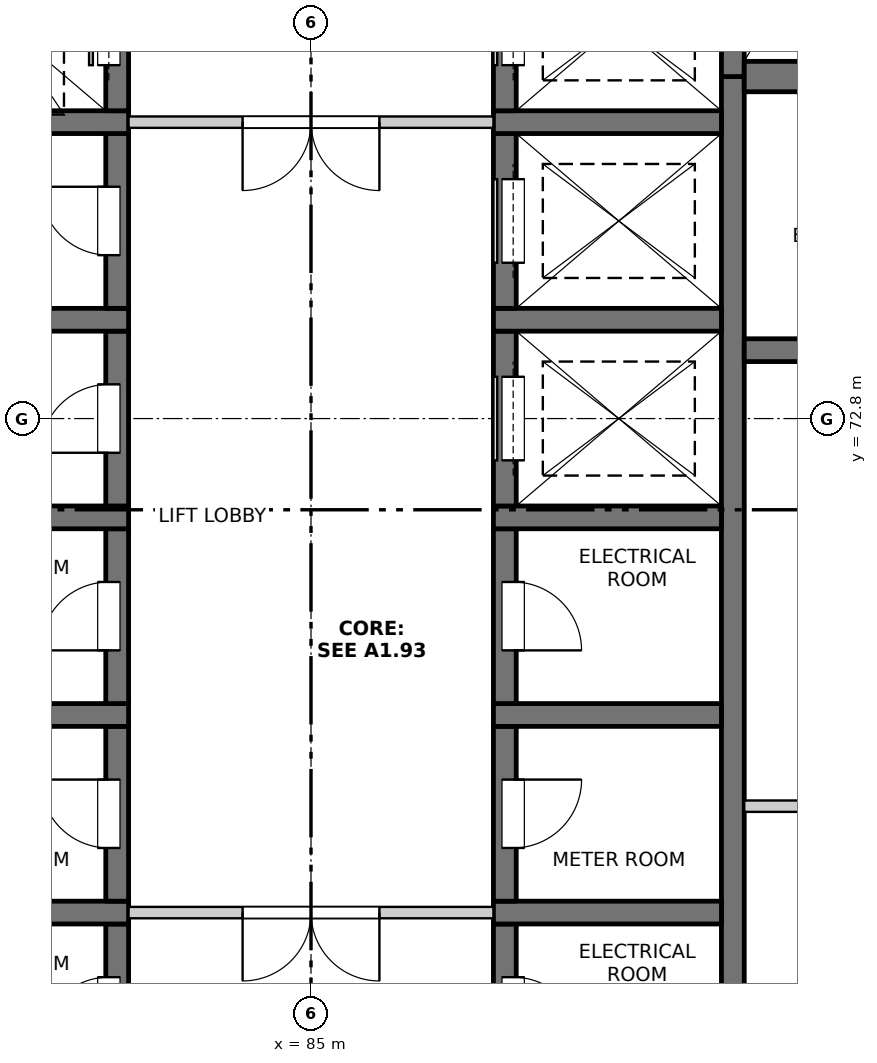
"""IFC4 building model, lengths in metres.
Left out: names, types, materials, properties, quantities, classifications, styles, units other than length and angle.
Written with IfcOpenShell. Run it as: python <this file> out.ifc"""

import sys

from ifc_helpers import new_model, si_unit, direction, frame, frame_2d, origin, place, context, subcontext, project, spatial, rectangle, extrude, element, fill, save


model = new_model("IFC4")
c1 = context("Model", 3, precision=1e-05, world=origin(), true_north=direction((0.0, 1.0)))
c2 = subcontext(c1, "Body", "Model", "MODEL_VIEW")
j1 = project(units=[si_unit("LENGTHUNIT", "METRE"), si_unit("PLANEANGLEUNIT", "RADIAN")], contexts=[c1])
p1 = place(None, origin())
s1 = spatial("IfcSite", under=j1, at=p1, CompositionType="ELEMENT")
p2 = place(p1, origin())
s2 = spatial("IfcBuilding", under=s1, at=p2, CompositionType="ELEMENT")
p3 = place(p2, frame((0.0, 0.0, 152.0)))
s3 = spatial("IfcBuildingStorey", under=s2, at=p3, CompositionType="ELEMENT", Elevation=152.0)
p4 = place(p3, frame((90.55, 61.95, -0.25), z_axis=(0.0, 0.0, 1.0), x_axis=(0.0, 1.0, 0.0)))
e1 = element("IfcWall", 1, at=p4, inside=s3, PredefinedType="SOLIDWALL", context=c2, shape_type="SweptSolid", body=[
    extrude(rectangle(XDim=15.35, YDim=0.3, at=frame_2d((7.675, 0.0))), origin(), (0.0, 0.0, 1.0), 3.4),
])
p5 = place(p3, frame((90.55, 77.3, -0.25), z_axis=(0.0, 0.0, 1.0), x_axis=(0.0, 1.0, 0.0)))
e2 = element("IfcWall", 2, at=p5, inside=s3, PredefinedType="SOLIDWALL", context=c2, shape_type="SweptSolid", body=[
    extrude(rectangle(XDim=6.925, YDim=0.3, at=frame_2d((3.462, 0.0))), origin(), (0.0, 0.0, 1.0), 3.4),
])
p6 = place(p3, frame((82.45, 63.85, -0.25), z_axis=(0.0, 0.0, 1.0), x_axis=(0.0, 1.0, 0.0)))
e3 = element("IfcWall", 3, at=p6, inside=s3, PredefinedType="SOLIDWALL", context=c2, shape_type="SweptSolid", body=[
    extrude(rectangle(XDim=2.3, YDim=0.3, at=frame_2d((1.15, 0.0))), origin(), (0.0, 0.0, 1.0), 3.4),
])
p7 = place(p6, frame((0.7, 0.0, 0.25)))
e4 = element("IfcOpeningElement", 4, at=p7, cuts=e3, PredefinedType="OPENING", context=c2, shape_type="SweptSolid", body=[
    extrude(rectangle(XDim=0.9, YDim=2.1, at=frame_2d((0.45, 1.05))), frame((0.0, 0.16, 0.0), z_axis=(0.0, -1.0, 0.0), x_axis=(1.0, 0.0, 0.0)), (0.0, 0.0, 1.0), 0.32),
])
p8 = place(p3, frame((79.6, 66.3, -0.25), z_axis=(0.0, 0.0, 1.0), x_axis=(1.0, 0.0, 0.0)))
e5 = element("IfcWall", 5, at=p8, inside=s3, PredefinedType="SOLIDWALL", context=c2, shape_type="SweptSolid", body=[
    extrude(rectangle(XDim=3.0, YDim=0.3, at=frame_2d((1.5, 0.0))), origin(), (0.0, 0.0, 1.0), 3.4),
])
p9 = place(p3, frame((82.45, 66.45, -0.25), z_axis=(0.0, 0.0, 1.0), x_axis=(0.0, 1.0, 0.0)))
e6 = element("IfcWall", 6, at=p9, inside=s3, PredefinedType="SOLIDWALL", context=c2, shape_type="SweptSolid", body=[
    extrude(rectangle(XDim=2.3, YDim=0.3, at=frame_2d((1.15, 0.0))), origin(), (0.0, 0.0, 1.0), 3.4),
])
p10 = place(p9, frame((0.7, 0.0, 0.25)))
e7 = element("IfcOpeningElement", 7, at=p10, cuts=e6, PredefinedType="OPENING", context=c2, shape_type="SweptSolid", body=[
    extrude(rectangle(XDim=0.9, YDim=2.1, at=frame_2d((0.45, 1.05))), frame((0.0, 0.16, 0.0), z_axis=(0.0, -1.0, 0.0), x_axis=(1.0, 0.0, 0.0)), (0.0, 0.0, 1.0), 0.32),
])
p11 = place(p3, frame((79.6, 68.9, -0.25), z_axis=(0.0, 0.0, 1.0), x_axis=(1.0, 0.0, 0.0)))
e8 = element("IfcWall", 8, at=p11, inside=s3, PredefinedType="SOLIDWALL", context=c2, shape_type="SweptSolid", body=[
    extrude(rectangle(XDim=3.0, YDim=0.3, at=frame_2d((1.5, 0.0))), origin(), (0.0, 0.0, 1.0), 3.4),
])
p12 = place(p3, frame((82.45, 69.05, -0.25), z_axis=(0.0, 0.0, 1.0), x_axis=(0.0, 1.0, 0.0)))
e9 = element("IfcWall", 9, at=p12, inside=s3, PredefinedType="SOLIDWALL", context=c2, shape_type="SweptSolid", body=[
    extrude(rectangle(XDim=2.3, YDim=0.3, at=frame_2d((1.15, 0.0))), origin(), (0.0, 0.0, 1.0), 3.4),
])
p13 = place(p12, frame((0.7, 0.0, 0.25)))
e10 = element("IfcOpeningElement", 10, at=p13, cuts=e9, PredefinedType="OPENING", context=c2, shape_type="SweptSolid", body=[
    extrude(rectangle(XDim=0.9, YDim=2.1, at=frame_2d((0.45, 1.05))), frame((0.0, 0.16, 0.0), z_axis=(0.0, -1.0, 0.0), x_axis=(1.0, 0.0, 0.0)), (0.0, 0.0, 1.0), 0.32),
])
p14 = place(p3, frame((79.6, 71.5, -0.25), z_axis=(0.0, 0.0, 1.0), x_axis=(1.0, 0.0, 0.0)))
e11 = element("IfcWall", 11, at=p14, inside=s3, PredefinedType="SOLIDWALL", context=c2, shape_type="SweptSolid", body=[
    extrude(rectangle(XDim=3.0, YDim=0.3, at=frame_2d((1.5, 0.0))), origin(), (0.0, 0.0, 1.0), 3.4),
])
p15 = place(p3, frame((82.45, 71.65, -0.25), z_axis=(0.0, 0.0, 1.0), x_axis=(0.0, 1.0, 0.0)))
e12 = element("IfcWall", 12, at=p15, inside=s3, PredefinedType="SOLIDWALL", context=c2, shape_type="SweptSolid", body=[
    extrude(rectangle(XDim=2.3, YDim=0.3, at=frame_2d((1.15, 0.0))), origin(), (0.0, 0.0, 1.0), 3.4),
])
p16 = place(p15, frame((0.7, 0.0, 0.25)))
e13 = element("IfcOpeningElement", 13, at=p16, cuts=e12, PredefinedType="OPENING", context=c2, shape_type="SweptSolid", body=[
    extrude(rectangle(XDim=0.9, YDim=2.1, at=frame_2d((0.45, 1.05))), frame((0.0, 0.16, 0.0), z_axis=(0.0, -1.0, 0.0), x_axis=(1.0, 0.0, 0.0)), (0.0, 0.0, 1.0), 0.32),
])
p17 = place(p3, frame((79.6, 74.1, -0.25), z_axis=(0.0, 0.0, 1.0), x_axis=(1.0, 0.0, 0.0)))
e14 = element("IfcWall", 14, at=p17, inside=s3, PredefinedType="SOLIDWALL", context=c2, shape_type="SweptSolid", body=[
    extrude(rectangle(XDim=3.0, YDim=0.3, at=frame_2d((1.5, 0.0))), origin(), (0.0, 0.0, 1.0), 3.4),
])
p18 = place(p3, frame((82.45, 74.25, -0.25), z_axis=(0.0, 0.0, 1.0), x_axis=(0.0, 1.0, 0.0)))
e15 = element("IfcWall", 15, at=p18, inside=s3, PredefinedType="SOLIDWALL", context=c2, shape_type="SweptSolid", body=[
    extrude(rectangle(XDim=2.3, YDim=0.3, at=frame_2d((1.15, 0.0))), origin(), (0.0, 0.0, 1.0), 3.4),
])
p19 = place(p18, frame((0.7, 0.0, 0.25)))
e16 = element("IfcOpeningElement", 16, at=p19, cuts=e15, PredefinedType="OPENING", context=c2, shape_type="SweptSolid", body=[
    extrude(rectangle(XDim=0.9, YDim=2.1, at=frame_2d((0.45, 1.05))), frame((0.0, 0.16, 0.0), z_axis=(0.0, -1.0, 0.0), x_axis=(1.0, 0.0, 0.0)), (0.0, 0.0, 1.0), 0.32),
])
p20 = place(p3, frame((79.6, 76.7, -0.25), z_axis=(0.0, 0.0, 1.0), x_axis=(1.0, 0.0, 0.0)))
e17 = element("IfcWall", 17, at=p20, inside=s3, PredefinedType="SOLIDWALL", context=c2, shape_type="SweptSolid", body=[
    extrude(rectangle(XDim=3.0, YDim=0.3, at=frame_2d((1.5, 0.0))), origin(), (0.0, 0.0, 1.0), 3.4),
])
p21 = place(p3, frame((82.45, 76.85, -0.25), z_axis=(0.0, 0.0, 1.0), x_axis=(0.0, 1.0, 0.0)))
e18 = element("IfcWall", 18, at=p21, inside=s3, PredefinedType="SOLIDWALL", context=c2, shape_type="SweptSolid", body=[
    extrude(rectangle(XDim=2.3, YDim=0.3, at=frame_2d((1.15, 0.0))), origin(), (0.0, 0.0, 1.0), 3.4),
])
p22 = place(p21, frame((0.6, 0.0, 0.25)))
e19 = element("IfcOpeningElement", 19, at=p22, cuts=e18, PredefinedType="OPENING", context=c2, shape_type="SweptSolid", body=[
    extrude(rectangle(XDim=1.1, YDim=2.1, at=frame_2d((0.55, 1.05))), frame((0.0, 0.16, 0.0), z_axis=(0.0, -1.0, 0.0), x_axis=(1.0, 0.0, 0.0)), (0.0, 0.0, 1.0), 0.32),
])
p23 = place(p3, frame((87.55, 63.85, -0.25), z_axis=(0.0, 0.0, 1.0), x_axis=(0.0, 1.0, 0.0)))
e20 = element("IfcWall", 20, at=p23, inside=s3, PredefinedType="SOLIDWALL", context=c2, shape_type="SweptSolid", body=[
    extrude(rectangle(XDim=2.3, YDim=0.3, at=frame_2d((1.15, 0.0))), origin(), (0.0, 0.0, 1.0), 3.4),
])
p24 = place(p23, frame((0.7, 0.0, 0.25)))
e21 = element("IfcOpeningElement", 21, at=p24, cuts=e20, PredefinedType="OPENING", context=c2, shape_type="SweptSolid", body=[
    extrude(rectangle(XDim=0.9, YDim=2.1, at=frame_2d((0.45, 1.05))), frame((0.0, 0.16, 0.0), z_axis=(0.0, -1.0, 0.0), x_axis=(1.0, 0.0, 0.0)), (0.0, 0.0, 1.0), 0.32),
])
p25 = place(p3, frame((87.4, 66.3, -0.25), z_axis=(0.0, 0.0, 1.0), x_axis=(1.0, 0.0, 0.0)))
e22 = element("IfcWall", 22, at=p25, inside=s3, PredefinedType="SOLIDWALL", context=c2, shape_type="SweptSolid", body=[
    extrude(rectangle(XDim=3.0, YDim=0.3, at=frame_2d((1.5, 0.0))), origin(), (0.0, 0.0, 1.0), 3.4),
])
p26 = place(p3, frame((87.55, 66.45, -0.25), z_axis=(0.0, 0.0, 1.0), x_axis=(0.0, 1.0, 0.0)))
e23 = element("IfcWall", 23, at=p26, inside=s3, PredefinedType="SOLIDWALL", context=c2, shape_type="SweptSolid", body=[
    extrude(rectangle(XDim=2.3, YDim=0.3, at=frame_2d((1.15, 0.0))), origin(), (0.0, 0.0, 1.0), 3.4),
])
p27 = place(p26, frame((0.7, 0.0, 0.25)))
e24 = element("IfcOpeningElement", 24, at=p27, cuts=e23, PredefinedType="OPENING", context=c2, shape_type="SweptSolid", body=[
    extrude(rectangle(XDim=0.9, YDim=2.1, at=frame_2d((0.45, 1.05))), frame((0.0, 0.16, 0.0), z_axis=(0.0, -1.0, 0.0), x_axis=(1.0, 0.0, 0.0)), (0.0, 0.0, 1.0), 0.32),
])
p28 = place(p3, frame((87.4, 68.9, -0.25), z_axis=(0.0, 0.0, 1.0), x_axis=(1.0, 0.0, 0.0)))
e25 = element("IfcWall", 25, at=p28, inside=s3, PredefinedType="SOLIDWALL", context=c2, shape_type="SweptSolid", body=[
    extrude(rectangle(XDim=3.0, YDim=0.3, at=frame_2d((1.5, 0.0))), origin(), (0.0, 0.0, 1.0), 3.4),
])
p29 = place(p3, frame((87.55, 69.05, -0.25), z_axis=(0.0, 0.0, 1.0), x_axis=(0.0, 1.0, 0.0)))
e26 = element("IfcWall", 26, at=p29, inside=s3, PredefinedType="SOLIDWALL", context=c2, shape_type="SweptSolid", body=[
    extrude(rectangle(XDim=2.3, YDim=0.3, at=frame_2d((1.15, 0.0))), origin(), (0.0, 0.0, 1.0), 3.4),
])
p30 = place(p29, frame((0.7, 0.0, 0.25)))
e27 = element("IfcOpeningElement", 27, at=p30, cuts=e26, PredefinedType="OPENING", context=c2, shape_type="SweptSolid", body=[
    extrude(rectangle(XDim=0.9, YDim=2.1, at=frame_2d((0.45, 1.05))), frame((0.0, 0.16, 0.0), z_axis=(0.0, -1.0, 0.0), x_axis=(1.0, 0.0, 0.0)), (0.0, 0.0, 1.0), 0.32),
])
p31 = place(p3, frame((87.4, 71.5, -0.25), z_axis=(0.0, 0.0, 1.0), x_axis=(1.0, 0.0, 0.0)))
e28 = element("IfcWall", 28, at=p31, inside=s3, PredefinedType="SOLIDWALL", context=c2, shape_type="SweptSolid", body=[
    extrude(rectangle(XDim=3.0, YDim=0.3, at=frame_2d((1.5, 0.0))), origin(), (0.0, 0.0, 1.0), 3.4),
])
p32 = place(p3, frame((87.55, 71.65, -0.25), z_axis=(0.0, 0.0, 1.0), x_axis=(0.0, 1.0, 0.0)))
e29 = element("IfcWall", 29, at=p32, inside=s3, PredefinedType="SOLIDWALL", context=c2, shape_type="SweptSolid", body=[
    extrude(rectangle(XDim=2.3, YDim=0.3, at=frame_2d((1.15, 0.0))), origin(), (0.0, 0.0, 1.0), 3.4),
])
p33 = place(p32, frame((0.6, 0.0, 0.25)))
e30 = element("IfcOpeningElement", 30, at=p33, cuts=e29, PredefinedType="OPENING", context=c2, shape_type="SweptSolid", body=[
    extrude(rectangle(XDim=1.1, YDim=2.1, at=frame_2d((0.55, 1.05))), frame((0.0, 0.16, 0.0), z_axis=(0.0, -1.0, 0.0), x_axis=(1.0, 0.0, 0.0)), (0.0, 0.0, 1.0), 0.32),
])
p34 = place(p3, frame((87.4, 74.1, -0.25), z_axis=(0.0, 0.0, 1.0), x_axis=(1.0, 0.0, 0.0)))
e31 = element("IfcWall", 31, at=p34, inside=s3, PredefinedType="SOLIDWALL", context=c2, shape_type="SweptSolid", body=[
    extrude(rectangle(XDim=3.0, YDim=0.3, at=frame_2d((1.5, 0.0))), origin(), (0.0, 0.0, 1.0), 3.4),
])
p35 = place(p3, frame((87.55, 74.25, -0.25), z_axis=(0.0, 0.0, 1.0), x_axis=(0.0, 1.0, 0.0)))
e32 = element("IfcWall", 32, at=p35, inside=s3, PredefinedType="SOLIDWALL", context=c2, shape_type="SweptSolid", body=[
    extrude(rectangle(XDim=2.3, YDim=0.3, at=frame_2d((1.15, 0.0))), origin(), (0.0, 0.0, 1.0), 3.4),
])
p36 = place(p35, frame((0.6, 0.0, 0.25)))
e33 = element("IfcOpeningElement", 33, at=p36, cuts=e32, PredefinedType="OPENING", context=c2, shape_type="SweptSolid", body=[
    extrude(rectangle(XDim=1.1, YDim=2.1, at=frame_2d((0.55, 1.05))), frame((0.0, 0.16, 0.0), z_axis=(0.0, -1.0, 0.0), x_axis=(1.0, 0.0, 0.0)), (0.0, 0.0, 1.0), 0.32),
])
p37 = place(p3, frame((87.4, 76.7, -0.25), z_axis=(0.0, 0.0, 1.0), x_axis=(1.0, 0.0, 0.0)))
e34 = element("IfcWall", 34, at=p37, inside=s3, PredefinedType="SOLIDWALL", context=c2, shape_type="SweptSolid", body=[
    extrude(rectangle(XDim=3.0, YDim=0.3, at=frame_2d((1.5, 0.0))), origin(), (0.0, 0.0, 1.0), 3.4),
])
p38 = place(p3, frame((87.55, 76.85, -0.25), z_axis=(0.0, 0.0, 1.0), x_axis=(0.0, 1.0, 0.0)))
e35 = element("IfcWall", 35, at=p38, inside=s3, PredefinedType="SOLIDWALL", context=c2, shape_type="SweptSolid", body=[
    extrude(rectangle(XDim=2.3, YDim=0.3, at=frame_2d((1.15, 0.0))), origin(), (0.0, 0.0, 1.0), 3.4),
])
p39 = place(p38, frame((0.6, 0.0, 0.25)))
e36 = element("IfcOpeningElement", 36, at=p39, cuts=e35, PredefinedType="OPENING", context=c2, shape_type="SweptSolid", body=[
    extrude(rectangle(XDim=1.1, YDim=2.1, at=frame_2d((0.55, 1.05))), frame((0.0, 0.16, 0.0), z_axis=(0.0, -1.0, 0.0), x_axis=(1.0, 0.0, 0.0)), (0.0, 0.0, 1.0), 0.32),
])
p40 = place(p3, frame((90.7, 73.7, -0.25), z_axis=(0.0, 0.0, 1.0), x_axis=(1.0, 0.0, 0.0)))
e37 = element("IfcWall", 37, at=p40, inside=s3, PredefinedType="SOLIDWALL", context=c2, shape_type="SweptSolid", body=[
    extrude(rectangle(XDim=3.775, YDim=0.3, at=frame_2d((1.888, 0.0))), origin(), (0.0, 0.0, 1.0), 3.4),
])
p41 = place(p3, frame((90.7, 77.3, -0.25), z_axis=(0.0, 0.0, 1.0), x_axis=(1.0, 0.0, 0.0)))
e38 = element("IfcWall", 38, at=p41, inside=s3, PredefinedType="SOLIDWALL", context=c2, shape_type="SweptSolid", body=[
    extrude(rectangle(XDim=3.775, YDim=0.4, at=frame_2d((1.888, 0.0))), origin(), (0.0, 0.0, 1.0), 3.4),
])
p42 = place(p3, frame((82.6, 66.3, 0.0), z_axis=(0.0, 0.0, 1.0), x_axis=(1.0, 0.0, 0.0)))
e39 = element("IfcWall", 39, at=p42, inside=s3, PredefinedType="PARTITIONING", context=c2, shape_type="SweptSolid", body=[
    extrude(rectangle(XDim=4.8, YDim=0.15, at=frame_2d((2.4, 0.0))), origin(), (0.0, 0.0, 1.0), 3.15),
])
p43 = place(p42, frame((1.5, 0.0, 0.0)))
e40 = element("IfcOpeningElement", 40, at=p43, cuts=e39, PredefinedType="OPENING", context=c2, shape_type="SweptSolid", body=[
    extrude(rectangle(XDim=1.8, YDim=2.1, at=frame_2d((0.9, 1.05))), frame((0.0, 0.085, 0.0), z_axis=(0.0, -1.0, 0.0), x_axis=(1.0, 0.0, 0.0)), (0.0, 0.0, 1.0), 0.17),
])
p44 = place(p3, frame((90.7, 67.7, 0.0), z_axis=(0.0, 0.0, 1.0), x_axis=(1.0, 0.0, 0.0)))
e41 = element("IfcWall", 41, at=p44, inside=s3, PredefinedType="PARTITIONING", context=c2, shape_type="SweptSolid", body=[
    extrude(rectangle(XDim=3.775, YDim=0.15, at=frame_2d((1.887, 0.0))), origin(), (0.0, 0.0, 1.0), 3.15),
])
p45 = place(p3, frame((82.6, 76.7, 0.0), z_axis=(0.0, 0.0, 1.0), x_axis=(1.0, 0.0, 0.0)))
e42 = element("IfcWall", 42, at=p45, inside=s3, PredefinedType="PARTITIONING", context=c2, shape_type="SweptSolid", body=[
    extrude(rectangle(XDim=4.8, YDim=0.15, at=frame_2d((2.4, 0.0))), origin(), (0.0, 0.0, 1.0), 3.15),
])
p46 = place(p45, frame((1.5, 0.0, 0.0)))
e43 = element("IfcOpeningElement", 43, at=p46, cuts=e42, PredefinedType="OPENING", context=c2, shape_type="SweptSolid", body=[
    extrude(rectangle(XDim=1.8, YDim=2.1, at=frame_2d((0.9, 1.05))), frame((0.0, 0.085, 0.0), z_axis=(0.0, -1.0, 0.0), x_axis=(1.0, 0.0, 0.0)), (0.0, 0.0, 1.0), 0.17),
])
p47 = place(p7, origin())
e44 = element("IfcDoor", 44, at=p47, inside=s3, OperationType="SINGLE_SWING_LEFT", PredefinedType="DOOR", context=c2, shape_type="SweptSolid", body=[
    extrude(rectangle(XDim=0.9, YDim=2.1, at=frame_2d((0.45, 1.05))), frame((0.0, 0.135, 0.0), z_axis=(0.0, -1.0, 0.0), x_axis=(1.0, 0.0, 0.0)), (0.0, 0.0, 1.0), 0.05),
])
fill(e4, e44)
p48 = place(p24, origin())
e45 = element("IfcDoor", 45, at=p48, inside=s3, OperationType="SINGLE_SWING_RIGHT", PredefinedType="DOOR", context=c2, shape_type="SweptSolid", body=[
    extrude(rectangle(XDim=0.9, YDim=2.1, at=frame_2d((0.45, 1.05))), frame((0.0, -0.085, 0.0), z_axis=(0.0, -1.0, 0.0), x_axis=(1.0, 0.0, 0.0)), (0.0, 0.0, 1.0), 0.05),
])
fill(e21, e45)
p49 = place(p43, origin())
e46 = element("IfcDoor", 46, at=p49, inside=s3, OperationType="DOUBLE_DOOR_SINGLE_SWING", PredefinedType="DOOR", context=c2, shape_type="SweptSolid", body=[
    extrude(rectangle(XDim=1.8, YDim=2.1, at=frame_2d((0.9, 1.05))), frame((0.0, 0.025, 0.0), z_axis=(0.0, -1.0, 0.0), x_axis=(1.0, 0.0, 0.0)), (0.0, 0.0, 1.0), 0.05),
])
fill(e40, e46)
p50 = place(p10, origin())
e47 = element("IfcDoor", 47, at=p50, inside=s3, OperationType="SINGLE_SWING_RIGHT", PredefinedType="DOOR", context=c2, shape_type="SweptSolid", body=[
    extrude(rectangle(XDim=0.9, YDim=2.1, at=frame_2d((0.45, 1.05))), frame((0.0, 0.135, 0.0), z_axis=(0.0, -1.0, 0.0), x_axis=(1.0, 0.0, 0.0)), (0.0, 0.0, 1.0), 0.05),
])
fill(e7, e47)
p51 = place(p27, origin())
e48 = element("IfcDoor", 48, at=p51, inside=s3, OperationType="SINGLE_SWING_LEFT", PredefinedType="DOOR", context=c2, shape_type="SweptSolid", body=[
    extrude(rectangle(XDim=0.9, YDim=2.1, at=frame_2d((0.45, 1.05))), frame((0.0, -0.085, 0.0), z_axis=(0.0, -1.0, 0.0), x_axis=(1.0, 0.0, 0.0)), (0.0, 0.0, 1.0), 0.05),
])
fill(e24, e48)
p52 = place(p13, origin())
e49 = element("IfcDoor", 49, at=p52, inside=s3, OperationType="SINGLE_SWING_LEFT", PredefinedType="DOOR", context=c2, shape_type="SweptSolid", body=[
    extrude(rectangle(XDim=0.9, YDim=2.1, at=frame_2d((0.45, 1.05))), frame((0.0, 0.135, 0.0), z_axis=(0.0, -1.0, 0.0), x_axis=(1.0, 0.0, 0.0)), (0.0, 0.0, 1.0), 0.05),
])
fill(e10, e49)
p53 = place(p30, origin())
e50 = element("IfcDoor", 50, at=p53, inside=s3, OperationType="SINGLE_SWING_RIGHT", PredefinedType="DOOR", context=c2, shape_type="SweptSolid", body=[
    extrude(rectangle(XDim=0.9, YDim=2.1, at=frame_2d((0.45, 1.05))), frame((0.0, -0.085, 0.0), z_axis=(0.0, -1.0, 0.0), x_axis=(1.0, 0.0, 0.0)), (0.0, 0.0, 1.0), 0.05),
])
fill(e27, e50)
p54 = place(p16, origin())
e51 = element("IfcDoor", 51, at=p54, inside=s3, OperationType="SINGLE_SWING_LEFT", PredefinedType="DOOR", context=c2, shape_type="SweptSolid", body=[
    extrude(rectangle(XDim=0.9, YDim=2.1, at=frame_2d((0.45, 1.05))), frame((0.0, 0.135, 0.0), z_axis=(0.0, -1.0, 0.0), x_axis=(1.0, 0.0, 0.0)), (0.0, 0.0, 1.0), 0.05),
])
fill(e13, e51)
p55 = place(p33, origin())
e52 = element("IfcDoor", 52, at=p55, inside=s3, OperationType="SLIDING_TO_LEFT", PredefinedType="DOOR", context=c2, shape_type="SweptSolid", body=[
    extrude(rectangle(XDim=1.1, YDim=2.1, at=frame_2d((0.55, 1.05))), frame((0.0, -0.085, 0.0), z_axis=(0.0, -1.0, 0.0), x_axis=(1.0, 0.0, 0.0)), (0.0, 0.0, 1.0), 0.05),
])
fill(e30, e52)
p56 = place(p19, origin())
e53 = element("IfcDoor", 53, at=p56, inside=s3, OperationType="SINGLE_SWING_RIGHT", PredefinedType="DOOR", context=c2, shape_type="SweptSolid", body=[
    extrude(rectangle(XDim=0.9, YDim=2.1, at=frame_2d((0.45, 1.05))), frame((0.0, 0.135, 0.0), z_axis=(0.0, -1.0, 0.0), x_axis=(1.0, 0.0, 0.0)), (0.0, 0.0, 1.0), 0.05),
])
fill(e16, e53)
p57 = place(p36, origin())
e54 = element("IfcDoor", 54, at=p57, inside=s3, OperationType="SLIDING_TO_LEFT", PredefinedType="DOOR", context=c2, shape_type="SweptSolid", body=[
    extrude(rectangle(XDim=1.1, YDim=2.1, at=frame_2d((0.55, 1.05))), frame((0.0, -0.085, 0.0), z_axis=(0.0, -1.0, 0.0), x_axis=(1.0, 0.0, 0.0)), (0.0, 0.0, 1.0), 0.05),
])
fill(e33, e54)
p58 = place(p46, origin())
e55 = element("IfcDoor", 55, at=p58, inside=s3, OperationType="DOUBLE_DOOR_SINGLE_SWING", PredefinedType="DOOR", context=c2, shape_type="SweptSolid", body=[
    extrude(rectangle(XDim=1.8, YDim=2.1, at=frame_2d((0.9, 1.05))), frame((0.0, 0.025, 0.0), z_axis=(0.0, -1.0, 0.0), x_axis=(1.0, 0.0, 0.0)), (0.0, 0.0, 1.0), 0.05),
])
fill(e43, e55)
p59 = place(p22, origin())
e56 = element("IfcDoor", 56, at=p59, inside=s3, OperationType="SLIDING_TO_LEFT", PredefinedType="DOOR", context=c2, shape_type="SweptSolid", body=[
    extrude(rectangle(XDim=1.1, YDim=2.1, at=frame_2d((0.55, 1.05))), frame((0.0, 0.135, 0.0), z_axis=(0.0, -1.0, 0.0), x_axis=(1.0, 0.0, 0.0)), (0.0, 0.0, 1.0), 0.05),
])
fill(e19, e56)
p60 = place(p39, origin())
e57 = element("IfcDoor", 57, at=p60, inside=s3, OperationType="SLIDING_TO_LEFT", PredefinedType="DOOR", context=c2, shape_type="SweptSolid", body=[
    extrude(rectangle(XDim=1.1, YDim=2.1, at=frame_2d((0.55, 1.05))), frame((0.0, -0.085, 0.0), z_axis=(0.0, -1.0, 0.0), x_axis=(1.0, 0.0, 0.0)), (0.0, 0.0, 1.0), 0.05),
])
fill(e36, e57)
save(model, sys.argv[1])
